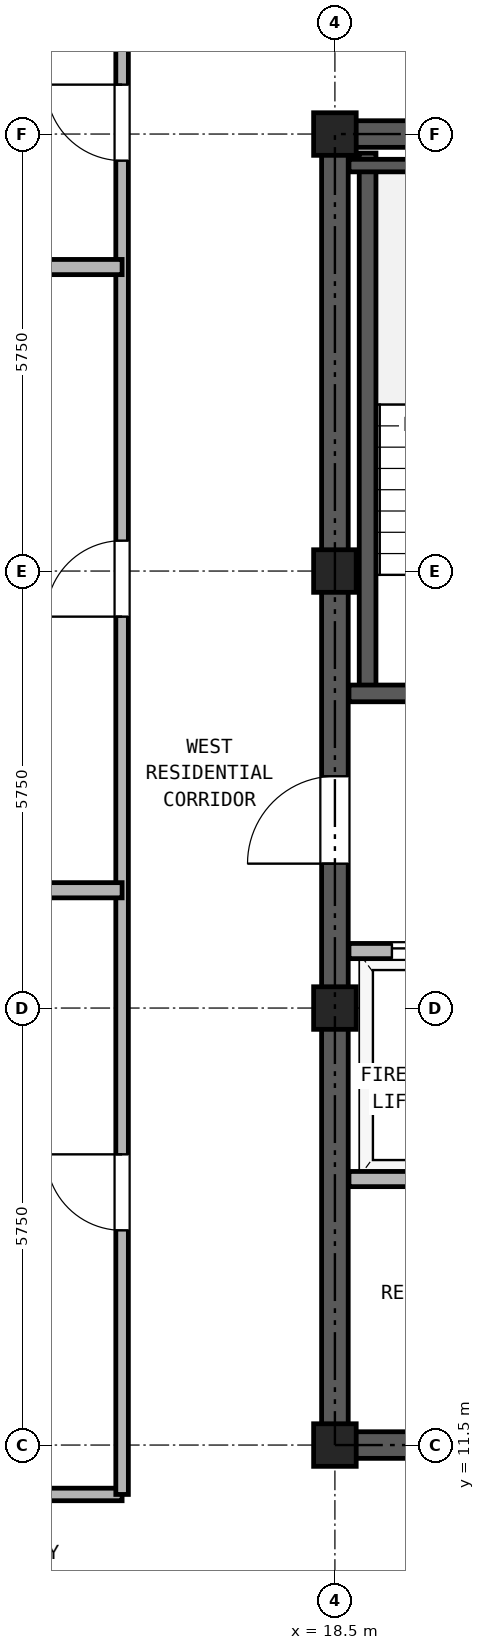
"""IFC4 building model, lengths in metres.
Left out: names, types, materials, properties, quantities, classifications, styles, units other than length and angle.
Written with IfcOpenShell. Run it as: python <this file> out.ifc"""

import sys

from ifc_helpers import new_model, si_unit, direction, frame, frame_2d, origin, origin_2d, place, context, subcontext, project, spatial, rectangle, hollow_rectangle, extrude, source, transform, mapped, element, fill, save


model = new_model("IFC4")
c1 = context("Model", 3, precision=1e-05, world=origin(), true_north=direction((0.0, 1.0)))
c2 = subcontext(c1, "Body", "Model", "MODEL_VIEW")
j1 = project(units=[si_unit("LENGTHUNIT", "METRE"), si_unit("PLANEANGLEUNIT", "RADIAN")], contexts=[c1])
p1 = place(None, origin())
s1 = spatial("IfcSite", under=j1, at=p1, CompositionType="ELEMENT")
p2 = place(p1, origin())
s2 = spatial("IfcBuilding", under=s1, at=p2, CompositionType="ELEMENT")
p3 = place(p2, frame((0.0, 0.0, 258.5)))
s3 = spatial("IfcBuildingStorey", under=s2, at=p3, CompositionType="ELEMENT", Elevation=258.5)
m1 = source(origin(), c2, "Body", "SweptSolid", [
    extrude(hollow_rectangle(XDim=0.56, YDim=0.56, WallThickness=0.03, at=origin_2d()), origin(), (0.0, 0.0, 1.0), 2.98),
])
for number, where, z_axis, x_axis in (
    (1, (18.5, 11.5, 0.0), (0.0, 0.0, 1.0), (1.0, 0.0, 0.0)),
    (2, (18.5, 17.25, 0.0), (0.0, 0.0, 1.0), (1.0, 0.0, 0.0)),
    (3, (18.5, 23.0, 0.0), (0.0, 0.0, 1.0), (1.0, 0.0, 0.0)),
    (4, (18.5, 28.75, 0.0), (0.0, 0.0, 1.0), (1.0, 0.0, 0.0)),
):
    element("IfcColumn", number, at=place(p3, frame(where, z_axis=z_axis, x_axis=x_axis)), inside=s3, PredefinedType="COLUMN", context=c2, shape_type="MappedRepresentation", body=[
        mapped(m1, transform((0.0, 0.0, 0.0), x_axis=(1.0, 0.0, 0.0), y_axis=(0.0, 1.0, 0.0), z_axis=(0.0, 0.0, 1.0), scale=1.0)),
    ])
p4 = place(p3, frame((18.325, 11.5, 0.0), z_axis=(0.0, 0.0, 1.0), x_axis=(1.0, 0.0, 0.0)))
e5 = element("IfcWall", 5, at=p4, inside=s3, PredefinedType="SHEAR", context=c2, shape_type="SweptSolid", body=[
    extrude(rectangle(XDim=10.35, YDim=0.35, at=frame_2d((5.175, 0.0))), origin(), (0.0, 0.0, 1.0), 2.98),
])
p5 = place(p4, frame((1.775, 0.0, 0.0)))
e6 = element("IfcOpeningElement", 6, at=p5, cuts=e5, PredefinedType="OPENING", context=c2, shape_type="SweptSolid", body=[
    extrude(rectangle(XDim=0.95, YDim=2.15, at=frame_2d((0.475, 1.075))), frame((0.0, 0.185, 0.0), z_axis=(0.0, -1.0, 0.0), x_axis=(1.0, 0.0, 0.0)), (0.0, 0.0, 1.0), 0.37),
])
p6 = place(p4, frame((5.275, 0.0, 0.0)))
e7 = element("IfcOpeningElement", 7, at=p6, cuts=e5, PredefinedType="OPENING", context=c2, shape_type="SweptSolid", body=[
    extrude(rectangle(XDim=0.95, YDim=2.15, at=frame_2d((0.475, 1.075))), frame((0.0, 0.185, 0.0), z_axis=(0.0, -1.0, 0.0), x_axis=(1.0, 0.0, 0.0)), (0.0, 0.0, 1.0), 0.37),
])
p7 = place(p4, frame((8.175, 0.0, 0.0)))
e8 = element("IfcOpeningElement", 8, at=p7, cuts=e5, PredefinedType="OPENING", context=c2, shape_type="SweptSolid", body=[
    extrude(rectangle(XDim=1.1, YDim=2.25, at=frame_2d((0.55, 1.125))), frame((0.0, 0.185, 0.0), z_axis=(0.0, -1.0, 0.0), x_axis=(1.0, 0.0, 0.0)), (0.0, 0.0, 1.0), 0.37),
])
p8 = place(p3, frame((18.325, 28.75, 0.0), z_axis=(0.0, 0.0, 1.0), x_axis=(1.0, 0.0, 0.0)))
e9 = element("IfcWall", 9, at=p8, inside=s3, PredefinedType="SHEAR", context=c2, shape_type="SweptSolid", body=[
    extrude(rectangle(XDim=10.35, YDim=0.35, at=frame_2d((5.175, 0.0))), origin(), (0.0, 0.0, 1.0), 2.98),
])
p9 = place(p8, frame((4.055, 0.0, 0.0)))
e10 = element("IfcOpeningElement", 10, at=p9, cuts=e9, PredefinedType="OPENING", context=c2, shape_type="SweptSolid", body=[
    extrude(rectangle(XDim=0.9, YDim=2.05, at=frame_2d((0.45, 1.025))), frame((0.0, 0.185, 0.0), z_axis=(0.0, -1.0, 0.0), x_axis=(1.0, 0.0, 0.0)), (0.0, 0.0, 1.0), 0.37),
])
p10 = place(p8, frame((5.595, 0.0, 0.0)))
e11 = element("IfcOpeningElement", 11, at=p10, cuts=e9, PredefinedType="OPENING", context=c2, shape_type="SweptSolid", body=[
    extrude(rectangle(XDim=0.9, YDim=2.05, at=frame_2d((0.45, 1.025))), frame((0.0, 0.185, 0.0), z_axis=(0.0, -1.0, 0.0), x_axis=(1.0, 0.0, 0.0)), (0.0, 0.0, 1.0), 0.37),
])
p11 = place(p3, frame((18.5, 11.675, 0.0), z_axis=(0.0, 0.0, 1.0), x_axis=(0.0, 1.0, 0.0)))
e12 = element("IfcWall", 12, at=p11, inside=s3, PredefinedType="SHEAR", context=c2, shape_type="SweptSolid", body=[
    extrude(rectangle(XDim=16.9, YDim=0.35, at=frame_2d((8.45, 0.0))), origin(), (0.0, 0.0, 1.0), 2.98),
])
p12 = place(p11, frame((7.475, 0.0, 0.0)))
e13 = element("IfcOpeningElement", 13, at=p12, cuts=e12, PredefinedType="OPENING", context=c2, shape_type="SweptSolid", body=[
    extrude(rectangle(XDim=1.15, YDim=2.2, at=frame_2d((0.575, 1.1))), frame((0.0, 0.185, 0.0), z_axis=(0.0, -1.0, 0.0), x_axis=(1.0, 0.0, 0.0)), (0.0, 0.0, 1.0), 0.37),
])
p13 = place(p3, frame((18.93, 21.39, 0.0), z_axis=(0.0, 0.0, 1.0), x_axis=(0.0, 1.0, 0.0)))
e14 = element("IfcWall", 14, at=p13, inside=s3, PredefinedType="SOLIDWALL", context=c2, shape_type="SweptSolid", body=[
    extrude(rectangle(XDim=7.11, YDim=0.22, at=frame_2d((3.555, 0.0))), origin(), (0.0, 0.0, 1.0), 2.98),
])
p14 = place(p3, frame((18.685, 28.335, 0.0), z_axis=(0.0, 0.0, 1.0), x_axis=(1.0, 0.0, 0.0)))
e15 = element("IfcWall", 15, at=p14, inside=s3, PredefinedType="PARTITIONING", context=c2, shape_type="SweptSolid", body=[
    extrude(rectangle(XDim=3.425, YDim=0.165, at=frame_2d((1.712, 0.0))), origin(), (0.0, 0.0, 1.0), 2.98),
])
p15 = place(p3, frame((18.685, 21.39, 0.0), z_axis=(0.0, 0.0, 1.0), x_axis=(1.0, 0.0, 0.0)))
e16 = element("IfcWall", 16, at=p15, inside=s3, PredefinedType="SOLIDWALL", context=c2, shape_type="SweptSolid", body=[
    extrude(rectangle(XDim=6.445, YDim=0.22, at=frame_2d((3.222, 0.0))), origin(), (0.0, 0.0, 1.0), 2.98),
])
p16 = place(p15, frame((1.165, 0.0, 0.0)))
e17 = element("IfcOpeningElement", 17, at=p16, cuts=e16, PredefinedType="OPENING", context=c2, shape_type="SweptSolid", body=[
    extrude(rectangle(XDim=1.15, YDim=2.2, at=frame_2d((0.575, 1.1))), frame((0.0, 0.12, 0.0), z_axis=(0.0, -1.0, 0.0), x_axis=(1.0, 0.0, 0.0)), (0.0, 0.0, 1.0), 0.24),
])
p17 = place(p15, frame((4.895, 0.0, 0.0)))
e18 = element("IfcOpeningElement", 18, at=p17, cuts=e16, PredefinedType="OPENING", context=c2, shape_type="SweptSolid", body=[
    extrude(rectangle(XDim=1.1, YDim=2.25, at=frame_2d((0.55, 1.125))), frame((0.0, 0.12, 0.0), z_axis=(0.0, -1.0, 0.0), x_axis=(1.0, 0.0, 0.0)), (0.0, 0.0, 1.0), 0.24),
])
p18 = place(p3, frame((18.685, 18.0, 0.0), z_axis=(0.0, 0.0, 1.0), x_axis=(1.0, 0.0, 0.0)))
e19 = element("IfcWall", 19, at=p18, inside=s3, PredefinedType="PARTITIONING", context=c2, shape_type="SweptSolid", body=[
    extrude(rectangle(XDim=9.63, YDim=0.2, at=frame_2d((4.815, 0.0))), origin(), (0.0, 0.0, 1.0), 2.98),
])
p19 = place(p18, frame((0.565, 0.0, 0.0)))
e20 = element("IfcOpeningElement", 20, at=p19, cuts=e19, PredefinedType="OPENING", context=c2, shape_type="SweptSolid", body=[
    extrude(rectangle(XDim=1.3, YDim=2.3, at=frame_2d((0.65, 1.15))), frame((0.0, 0.11, 0.0), z_axis=(0.0, -1.0, 0.0), x_axis=(1.0, 0.0, 0.0)), (0.0, 0.0, 1.0), 0.22),
])
p20 = place(p18, frame((2.665, 0.0, 0.0)))
e21 = element("IfcOpeningElement", 21, at=p20, cuts=e19, PredefinedType="OPENING", context=c2, shape_type="SweptSolid", body=[
    extrude(rectangle(XDim=1.3, YDim=2.3, at=frame_2d((0.65, 1.15))), frame((0.0, 0.11, 0.0), z_axis=(0.0, -1.0, 0.0), x_axis=(1.0, 0.0, 0.0)), (0.0, 0.0, 1.0), 0.22),
])
p21 = place(p18, frame((7.165, 0.0, 0.0)))
e22 = element("IfcOpeningElement", 22, at=p21, cuts=e19, PredefinedType="OPENING", context=c2, shape_type="SweptSolid", body=[
    extrude(rectangle(XDim=1.0, YDim=2.15, at=frame_2d((0.5, 1.075))), frame((0.0, 0.11, 0.0), z_axis=(0.0, -1.0, 0.0), x_axis=(1.0, 0.0, 0.0)), (0.0, 0.0, 1.0), 0.22),
])
p22 = place(p3, frame((18.685, 15.0, 0.0), z_axis=(0.0, 0.0, 1.0), x_axis=(1.0, 0.0, 0.0)))
e23 = element("IfcWall", 23, at=p22, inside=s3, PredefinedType="PARTITIONING", context=c2, shape_type="SweptSolid", body=[
    extrude(rectangle(XDim=9.63, YDim=0.2, at=frame_2d((4.815, 0.0))), origin(), (0.0, 0.0, 1.0), 2.98),
])
p23 = place(p3, frame((8.56, 10.85, 0.0), z_axis=(0.0, 0.0, 1.0), x_axis=(1.0, 0.0, 0.0)))
e24 = element("IfcWall", 24, at=p23, inside=s3, PredefinedType="PARTITIONING", context=c2, shape_type="SweptSolid", body=[
    extrude(rectangle(XDim=7.14, YDim=0.165, at=frame_2d((3.57, 0.0))), origin(), (0.0, 0.0, 1.0), 2.98),
])
p24 = place(p3, frame((15.7, 10.85, 0.0), z_axis=(0.0, 0.0, 1.0), x_axis=(0.0, 1.0, 0.0)))
e25 = element("IfcWall", 25, at=p24, inside=s3, PredefinedType="PARTITIONING", context=c2, shape_type="SweptSolid", body=[
    extrude(rectangle(XDim=24.29, YDim=0.165, at=frame_2d((12.145, 0.0))), origin(), (0.0, 0.0, 1.0), 2.98),
])
p25 = place(p24, frame((3.475, 0.0, 0.0)))
e26 = element("IfcOpeningElement", 26, at=p25, cuts=e25, PredefinedType="OPENING", context=c2, shape_type="SweptSolid", body=[
    extrude(rectangle(XDim=1.0, YDim=2.15, at=frame_2d((0.5, 1.075))), frame((0.0, 0.093, 0.0), z_axis=(0.0, -1.0, 0.0), x_axis=(1.0, 0.0, 0.0)), (0.0, 0.0, 1.0), 0.185),
])
p26 = place(p24, frame((11.55, 0.0, 0.0)))
e27 = element("IfcOpeningElement", 27, at=p26, cuts=e25, PredefinedType="OPENING", context=c2, shape_type="SweptSolid", body=[
    extrude(rectangle(XDim=1.0, YDim=2.15, at=frame_2d((0.5, 1.075))), frame((0.0, 0.093, 0.0), z_axis=(0.0, -1.0, 0.0), x_axis=(1.0, 0.0, 0.0)), (0.0, 0.0, 1.0), 0.185),
])
p27 = place(p24, frame((17.55, 0.0, 0.0)))
e28 = element("IfcOpeningElement", 28, at=p27, cuts=e25, PredefinedType="OPENING", context=c2, shape_type="SweptSolid", body=[
    extrude(rectangle(XDim=1.0, YDim=2.15, at=frame_2d((0.5, 1.075))), frame((0.0, 0.093, 0.0), z_axis=(0.0, -1.0, 0.0), x_axis=(1.0, 0.0, 0.0)), (0.0, 0.0, 1.0), 0.185),
])
for number, where, z_axis, x_axis in (
    (29, (5.36, 18.8, 0.0), (0.0, 0.0, 1.0), (1.0, 0.0, 0.0)),
    (30, (5.36, 27.0, 0.0), (0.0, 0.0, 1.0), (1.0, 0.0, 0.0)),
):
    element("IfcWall", number, at=place(p3, frame(where, z_axis=z_axis, x_axis=x_axis)), inside=s3, PredefinedType="PARTITIONING", context=c2, shape_type="SweptSolid", body=[
        extrude(rectangle(XDim=10.34, YDim=0.2, at=frame_2d((5.17, 0.0))), origin(), (0.0, 0.0, 1.0), 2.98),
    ])
p28 = place(p19, origin())
e31 = element("IfcDoor", 31, at=p28, inside=s3, OperationType="DOUBLE_DOOR_SLIDING", PredefinedType="DOOR", context=c2, shape_type="SweptSolid", body=[
    extrude(rectangle(XDim=1.3, YDim=2.3, at=frame_2d((0.65, 1.15))), frame((0.0, 0.025, 0.0), z_axis=(0.0, -1.0, 0.0), x_axis=(1.0, 0.0, 0.0)), (0.0, 0.0, 1.0), 0.05),
])
fill(e20, e31)
p29 = place(p12, frame((1.15, 0.0, 0.0), z_axis=(0.0, 0.0, 1.0), x_axis=(-1.0, 0.0, 0.0)))
e32 = element("IfcDoor", 32, at=p29, inside=s3, OperationType="SINGLE_SWING_LEFT", PredefinedType="DOOR", context=c2, shape_type="SweptSolid", body=[
    extrude(rectangle(XDim=1.15, YDim=2.2, at=frame_2d((0.575, 1.1))), frame((0.0, 0.025, 0.0), z_axis=(0.0, -1.0, 0.0), x_axis=(1.0, 0.0, 0.0)), (0.0, 0.0, 1.0), 0.05),
])
fill(e13, e32)
p30 = place(p25, origin())
e33 = element("IfcDoor", 33, at=p30, inside=s3, OperationType="SINGLE_SWING_RIGHT", PredefinedType="DOOR", context=c2, shape_type="SweptSolid", body=[
    extrude(rectangle(XDim=1.0, YDim=2.15, at=frame_2d((0.5, 1.075))), frame((0.0, 0.025, 0.0), z_axis=(0.0, -1.0, 0.0), x_axis=(1.0, 0.0, 0.0)), (0.0, 0.0, 1.0), 0.05),
])
fill(e26, e33)
p31 = place(p26, origin())
e34 = element("IfcDoor", 34, at=p31, inside=s3, OperationType="SINGLE_SWING_LEFT", PredefinedType="DOOR", context=c2, shape_type="SweptSolid", body=[
    extrude(rectangle(XDim=1.0, YDim=2.15, at=frame_2d((0.5, 1.075))), frame((0.0, 0.025, 0.0), z_axis=(0.0, -1.0, 0.0), x_axis=(1.0, 0.0, 0.0)), (0.0, 0.0, 1.0), 0.05),
])
fill(e27, e34)
p32 = place(p27, origin())
e35 = element("IfcDoor", 35, at=p32, inside=s3, OperationType="SINGLE_SWING_RIGHT", PredefinedType="DOOR", context=c2, shape_type="SweptSolid", body=[
    extrude(rectangle(XDim=1.0, YDim=2.15, at=frame_2d((0.5, 1.075))), frame((0.0, 0.025, 0.0), z_axis=(0.0, -1.0, 0.0), x_axis=(1.0, 0.0, 0.0)), (0.0, 0.0, 1.0), 0.05),
])
fill(e28, e35)
save(model, sys.argv[1])
